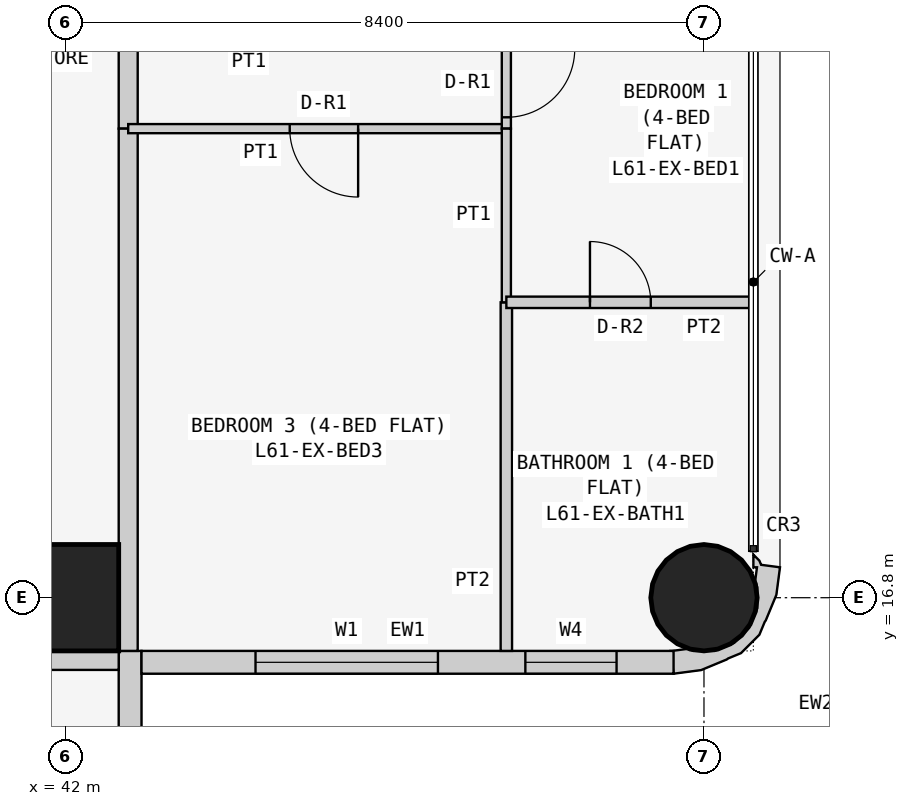
"""IFC4 building model, lengths in metres.
Left out: names, types, materials, properties, quantities, classifications, styles, units other than length and angle.
Written with IfcOpenShell. Run it as: python <this file> out.ifc"""

import sys

from ifc_helpers import new_model, si_unit, direction, frame, frame_2d, origin, origin_2d, place, context, subcontext, project, spatial, polyline, rectangle, circle, outline, extrude, element, fill, save


model = new_model("IFC4")
c1 = context("Model", 3, precision=1e-05, world=origin(), true_north=direction((0.0, 1.0)))
c2 = subcontext(c1, "Body", "Model", "MODEL_VIEW")
j1 = project(units=[si_unit("LENGTHUNIT", "METRE"), si_unit("PLANEANGLEUNIT", "RADIAN")], contexts=[c1])
p1 = place(None, origin())
s1 = spatial("IfcSite", under=j1, at=p1, CompositionType="ELEMENT")
p2 = place(p1, origin())
s2 = spatial("IfcBuilding", under=s1, at=p2, CompositionType="ELEMENT")
p3 = place(p2, frame((0.0, 0.0, 233.7)))
s3 = spatial("IfcBuildingStorey", under=s2, at=p3, CompositionType="ELEMENT", Elevation=233.7)
p4 = place(p3, frame((42.0, 16.8, 0.0), z_axis=(0.0, 0.0, 1.0), x_axis=(1.0, 0.0, 0.0)))
e1 = element("IfcColumn", 1, at=p4, inside=s3, PredefinedType="COLUMN", context=c2, shape_type="SweptSolid", body=[
    extrude(rectangle(XDim=1.4, YDim=1.4, at=origin_2d()), origin(), (0.0, 0.0, 1.0), 3.6),
])
p5 = place(p3, frame((50.4, 16.8, 0.0), z_axis=(0.0, 0.0, 1.0), x_axis=(1.0, 0.0, 0.0)))
e2 = element("IfcColumn", 2, at=p5, inside=s3, PredefinedType="COLUMN", context=c2, shape_type="SweptSolid", body=[
    extrude(circle(Radius=0.7, at=origin_2d()), origin(), (0.0, 0.0, 1.0), 3.6),
])
p6 = place(p3, frame((42.85, 8.8, 0.0), z_axis=(0.0, 0.0, 1.0), x_axis=(0.0, 1.0, 0.0)))
e3 = element("IfcWall", 3, at=p6, inside=s3, PredefinedType="SOLIDWALL", context=c2, shape_type="SweptSolid", body=[
    extrude(rectangle(XDim=7.3, YDim=0.3, at=frame_2d((3.65, 0.0))), origin(), (0.0, 0.0, 1.0), 3.45),
])
p7 = place(p6, frame((3.1, 0.0, 0.9)))
e4 = element("IfcOpeningElement", 4, at=p7, cuts=e3, PredefinedType="OPENING", context=c2, shape_type="SweptSolid", body=[
    extrude(rectangle(XDim=2.4, YDim=1.5, at=frame_2d((1.2, 0.75))), frame((0.0, 0.16, 0.0), z_axis=(0.0, -1.0, 0.0), x_axis=(1.0, 0.0, 0.0)), (0.0, 0.0, 1.0), 0.32),
])
p8 = place(p6, frame((0.75, 0.0, 0.9)))
e5 = element("IfcOpeningElement", 5, at=p8, cuts=e3, PredefinedType="OPENING", context=c2, shape_type="SweptSolid", body=[
    extrude(rectangle(XDim=1.2, YDim=1.5, at=frame_2d((0.6, 0.75))), frame((0.0, 0.16, 0.0), z_axis=(0.0, -1.0, 0.0), x_axis=(1.0, 0.0, 0.0)), (0.0, 0.0, 1.0), 0.32),
])
p9 = place(p3, frame((43.0, 15.95, 0.0), z_axis=(0.0, 0.0, 1.0), x_axis=(1.0, 0.0, 0.0)))
e6 = element("IfcWall", 6, at=p9, inside=s3, PredefinedType="SOLIDWALL", context=c2, shape_type="SweptSolid", body=[
    extrude(rectangle(XDim=7.0, YDim=0.3, at=frame_2d((3.5, 0.0))), origin(), (0.0, 0.0, 1.0), 3.45),
])
p10 = place(p9, frame((1.5, 0.0, 0.9)))
e7 = element("IfcOpeningElement", 7, at=p10, cuts=e6, PredefinedType="OPENING", context=c2, shape_type="SweptSolid", body=[
    extrude(rectangle(XDim=2.4, YDim=1.5, at=frame_2d((1.2, 0.75))), frame((0.0, 0.16, 0.0), z_axis=(0.0, -1.0, 0.0), x_axis=(1.0, 0.0, 0.0)), (0.0, 0.0, 1.0), 0.32),
])
p11 = place(p9, frame((5.05, 0.0, 0.9)))
e8 = element("IfcOpeningElement", 8, at=p11, cuts=e6, PredefinedType="OPENING", context=c2, shape_type="SweptSolid", body=[
    extrude(rectangle(XDim=1.2, YDim=1.5, at=frame_2d((0.6, 0.75))), frame((0.0, 0.16, 0.0), z_axis=(0.0, -1.0, 0.0), x_axis=(1.0, 0.0, 0.0)), (0.0, 0.0, 1.0), 0.32),
])
p12 = place(p3, frame((50.11, 16.076, 0.0), z_axis=(0.0, 0.0, 1.0), x_axis=(0.898030234854, -0.439933741929, 0.0)))
e9 = element("IfcWall", 9, at=p12, inside=s3, PredefinedType="SOLIDWALL", context=c2, shape_type="SweptSolid", body=[
    extrude(outline(polyline([(0.664, 1.577), (0.426, 1.497), (0.382, 1.536), (0.276, 1.572), (0.349, 1.423), (0.392, 1.444), (0.453, 1.261), (0.51, 1.211), (0.632, 0.961), (0.65, 0.683), (0.56, 0.419), (0.375, 0.21), (0.125, 0.087), (0.05, 0.082), (-0.128, -0.035), (-0.145, -0.044), (0.022, -0.296), (0.327, -0.094), (0.568, 0.18), (0.577, 0.199), (0.7, 0.337), (0.811, 0.661), (0.799, 0.846), (0.803, 0.866), (0.78, 1.231), (0.664, 1.577)])), origin(), (0.0, 0.0, 1.0), 3.45),
])
p13 = place(p3, frame((42.825, 24.171, 0.0), z_axis=(0.0, 0.0, 1.0), x_axis=(0.0, -1.0, 0.0)))
e10 = element("IfcWall", 10, at=p13, inside=s3, PredefinedType="PARTITIONING", context=c2, shape_type="SweptSolid", body=[
    extrude(rectangle(XDim=1.2, YDim=0.25, at=frame_2d((0.6, 0.0))), origin(), (0.0, 0.0, 1.0), 3.45),
])
p14 = place(p3, frame((42.825, 22.971, 0.0), z_axis=(0.0, 0.0, 1.0), x_axis=(0.0, -1.0, 0.0)))
e11 = element("IfcWall", 11, at=p14, inside=s3, PredefinedType="PARTITIONING", context=c2, shape_type="SweptSolid", body=[
    extrude(rectangle(XDim=6.871, YDim=0.25, at=frame_2d((3.436, 0.0))), origin(), (0.0, 0.0, 1.0), 3.45),
])
p15 = place(p3, frame((42.7, 15.975, 0.0), z_axis=(0.0, 0.0, 1.0), x_axis=(-1.0, 0.0, 0.0)))
e12 = element("IfcWall", 12, at=p15, inside=s3, PredefinedType="PARTITIONING", context=c2, shape_type="SweptSolid", body=[
    extrude(rectangle(XDim=6.471, YDim=0.25, at=frame_2d((3.235, 0.0))), origin(), (0.0, 0.0, 1.0), 3.45),
])
p16 = place(p3, frame((47.8, 22.971, 0.0), z_axis=(0.0, 0.0, 1.0), x_axis=(-1.0, 0.0, 0.0)))
e13 = element("IfcWall", 13, at=p16, inside=s3, PredefinedType="PARTITIONING", context=c2, shape_type="SweptSolid", body=[
    extrude(rectangle(XDim=4.975, YDim=0.12, at=frame_2d((2.488, 0.0))), origin(), (0.0, 0.0, 1.0), 3.45),
])
p17 = place(p16, frame((1.95, 0.0, 0.0)))
e14 = element("IfcOpeningElement", 14, at=p17, cuts=e13, PredefinedType="OPENING", context=c2, shape_type="SweptSolid", body=[
    extrude(rectangle(XDim=0.9, YDim=2.1, at=frame_2d((0.45, 1.05))), frame((0.0, 0.07, 0.0), z_axis=(0.0, -1.0, 0.0), x_axis=(1.0, 0.0, 0.0)), (0.0, 0.0, 1.0), 0.14),
])
p18 = place(p3, frame((47.8, 24.171, 0.0), z_axis=(0.0, 0.0, 1.0), x_axis=(0.0, -1.0, 0.0)))
e15 = element("IfcWall", 15, at=p18, inside=s3, PredefinedType="PARTITIONING", context=c2, shape_type="SweptSolid", body=[
    extrude(rectangle(XDim=1.2, YDim=0.12, at=frame_2d((0.6, 0.0))), origin(), (0.0, 0.0, 1.0), 3.45),
])
p19 = place(p18, frame((0.151, 0.0, 0.0)))
e16 = element("IfcOpeningElement", 16, at=p19, cuts=e15, PredefinedType="OPENING", context=c2, shape_type="SweptSolid", body=[
    extrude(rectangle(XDim=0.9, YDim=2.1, at=frame_2d((0.45, 1.05))), frame((0.0, 0.07, 0.0), z_axis=(0.0, -1.0, 0.0), x_axis=(1.0, 0.0, 0.0)), (0.0, 0.0, 1.0), 0.14),
])
p20 = place(p3, frame((47.8, 16.1, 0.0), z_axis=(0.0, 0.0, 1.0), x_axis=(0.0, 1.0, 0.0)))
e17 = element("IfcWall", 17, at=p20, inside=s3, PredefinedType="PARTITIONING", context=c2, shape_type="SweptSolid", body=[
    extrude(rectangle(XDim=4.586, YDim=0.15, at=frame_2d((2.293, 0.0))), origin(), (0.0, 0.0, 1.0), 3.45),
])
p21 = place(p3, frame((47.8, 20.686, 0.0), z_axis=(0.0, 0.0, 1.0), x_axis=(0.0, 1.0, 0.0)))
e18 = element("IfcWall", 18, at=p21, inside=s3, PredefinedType="PARTITIONING", context=c2, shape_type="SweptSolid", body=[
    extrude(rectangle(XDim=2.285, YDim=0.12, at=frame_2d((1.143, 0.0))), origin(), (0.0, 0.0, 1.0), 3.45),
])
p22 = place(p3, frame((51.05, 20.686, 0.0), z_axis=(0.0, 0.0, 1.0), x_axis=(-1.0, 0.0, 0.0)))
e19 = element("IfcWall", 19, at=p22, inside=s3, PredefinedType="PARTITIONING", context=c2, shape_type="SweptSolid", body=[
    extrude(rectangle(XDim=3.25, YDim=0.15, at=frame_2d((1.625, 0.0))), origin(), (0.0, 0.0, 1.0), 3.45),
])
p23 = place(p22, frame((1.35, 0.0, 0.0)))
e20 = element("IfcOpeningElement", 20, at=p23, cuts=e19, PredefinedType="OPENING", context=c2, shape_type="SweptSolid", body=[
    extrude(rectangle(XDim=0.8, YDim=2.1, at=frame_2d((0.4, 1.05))), frame((0.0, 0.085, 0.0), z_axis=(0.0, -1.0, 0.0), x_axis=(1.0, 0.0, 0.0)), (0.0, 0.0, 1.0), 0.17),
])
p24 = place(p10, origin())
e21 = element("IfcWindow", 21, at=p24, inside=s3, PartitioningType="SINGLE_PANEL", PredefinedType="WINDOW", context=c2, shape_type="SweptSolid", body=[
    extrude(rectangle(XDim=2.4, YDim=1.5, at=frame_2d((1.2, 0.75))), frame((0.0, 0.03, 0.0), z_axis=(0.0, -1.0, 0.0), x_axis=(1.0, 0.0, 0.0)), (0.0, 0.0, 1.0), 0.06),
])
fill(e7, e21)
p25 = place(p11, origin())
e22 = element("IfcWindow", 22, at=p25, inside=s3, PartitioningType="SINGLE_PANEL", PredefinedType="WINDOW", context=c2, shape_type="SweptSolid", body=[
    extrude(rectangle(XDim=1.2, YDim=1.5, at=frame_2d((0.6, 0.75))), frame((0.0, 0.03, 0.0), z_axis=(0.0, -1.0, 0.0), x_axis=(1.0, 0.0, 0.0)), (0.0, 0.0, 1.0), 0.06),
])
fill(e8, e22)
p26 = place(p17, origin())
e23 = element("IfcDoor", 23, at=p26, inside=s3, OperationType="SINGLE_SWING_LEFT", PredefinedType="DOOR", context=c2, shape_type="SweptSolid", body=[
    extrude(rectangle(XDim=0.9, YDim=2.1, at=frame_2d((0.45, 1.05))), frame((0.0, 0.025, 0.0), z_axis=(0.0, -1.0, 0.0), x_axis=(1.0, 0.0, 0.0)), (0.0, 0.0, 1.0), 0.05),
])
fill(e14, e23)
p27 = place(p19, origin())
e24 = element("IfcDoor", 24, at=p27, inside=s3, OperationType="SINGLE_SWING_LEFT", PredefinedType="DOOR", context=c2, shape_type="SweptSolid", body=[
    extrude(rectangle(XDim=0.9, YDim=2.1, at=frame_2d((0.45, 1.05))), frame((0.0, 0.025, 0.0), z_axis=(0.0, -1.0, 0.0), x_axis=(1.0, 0.0, 0.0)), (0.0, 0.0, 1.0), 0.05),
])
fill(e16, e24)
p28 = place(p23, frame((0.8, 0.0, 0.0), z_axis=(0.0, 0.0, 1.0), x_axis=(-1.0, 0.0, 0.0)))
e25 = element("IfcDoor", 25, at=p28, inside=s3, OperationType="SINGLE_SWING_LEFT", PredefinedType="DOOR", context=c2, shape_type="SweptSolid", body=[
    extrude(rectangle(XDim=0.8, YDim=2.1, at=frame_2d((0.4, 1.05))), frame((0.0, 0.025, 0.0), z_axis=(0.0, -1.0, 0.0), x_axis=(1.0, 0.0, 0.0)), (0.0, 0.0, 1.0), 0.05),
])
fill(e20, e25)
save(model, sys.argv[1])
